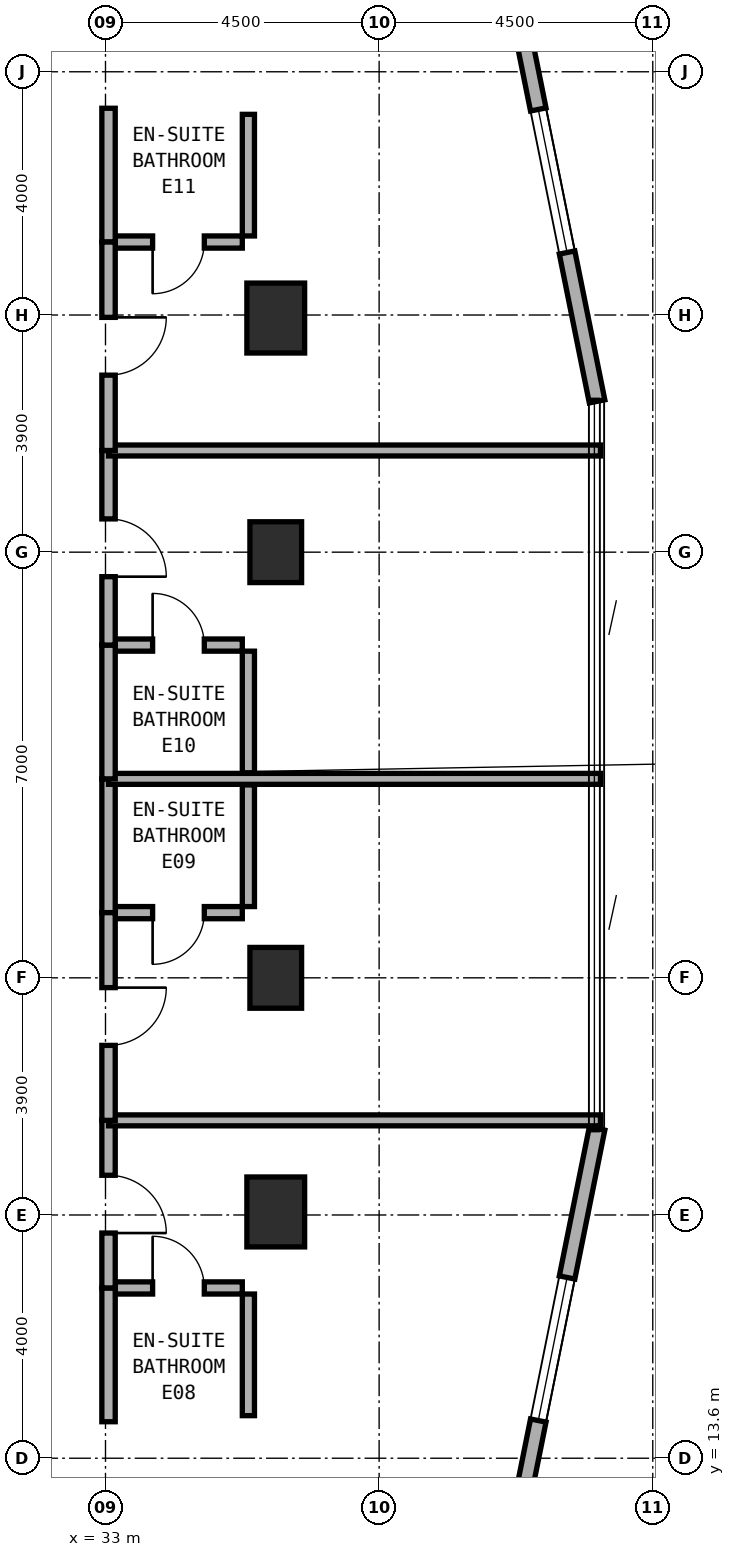
"""IFC4 building model, lengths in metres.
Left out: names, types, materials, properties, quantities, classifications, styles, units other than length and angle.
Written with IfcOpenShell. Run it as: python <this file> out.ifc"""

import sys

from ifc_helpers import new_model, si_unit, direction, frame, frame_2d, origin, origin_2d, place, context, subcontext, project, spatial, rectangle, extrude, element, fill, save


model = new_model("IFC4")
c1 = context("Model", 3, precision=1e-05, world=origin(), true_north=direction((0.0, 1.0)))
c2 = subcontext(c1, "Body", "Model", "MODEL_VIEW")
j1 = project(units=[si_unit("LENGTHUNIT", "METRE"), si_unit("PLANEANGLEUNIT", "RADIAN")], contexts=[c1])
p1 = place(None, origin())
s1 = spatial("IfcSite", under=j1, at=p1, CompositionType="ELEMENT")
p2 = place(p1, origin())
s2 = spatial("IfcBuilding", under=s1, at=p2, CompositionType="ELEMENT")
p3 = place(p2, frame((0.0, 0.0, 95.0)))
s3 = spatial("IfcBuildingStorey", under=s2, at=p3, CompositionType="ELEMENT", Elevation=95.0)
for number, where, z_axis, x_axis in (
    (1, (35.8, 21.5, 0.0), (0.0, 0.0, 1.0), (1.0, 0.0, 0.0)),
    (2, (35.8, 28.5, 0.0), (0.0, 0.0, 1.0), (1.0, 0.0, 0.0)),
):
    element("IfcColumn", number, at=place(p3, frame(where, z_axis=z_axis, x_axis=x_axis)), inside=s3, PredefinedType="COLUMN", context=c2, shape_type="SweptSolid", body=[
        extrude(rectangle(XDim=0.85, YDim=1.0, at=origin_2d()), origin(), (0.0, 0.0, 1.0), 3.5),
    ])
for number, where, z_axis, x_axis in (
    (3, (35.8, 17.65, 0.0), (0.0, 0.0, 1.0), (1.0, 0.0, 0.0)),
    (4, (35.8, 32.35, 0.0), (0.0, 0.0, 1.0), (1.0, 0.0, 0.0)),
):
    element("IfcColumn", number, at=place(p3, frame(where, z_axis=z_axis, x_axis=x_axis)), inside=s3, PredefinedType="COLUMN", context=c2, shape_type="SweptSolid", body=[
        extrude(rectangle(XDim=0.95, YDim=1.15, at=origin_2d()), origin(), (0.0, 0.0, 1.0), 3.5),
    ])
p4 = place(p3, frame((39.271, 10.018, 0.0), z_axis=(0.0, 0.0, 1.0), x_axis=(0.197435082048, 0.980315963543, 0.0)))
e5 = element("IfcWall", 5, at=p4, inside=s3, PredefinedType="STANDARD", context=c2, shape_type="SweptSolid", body=[
    extrude(rectangle(XDim=9.183, YDim=0.26, at=frame_2d((4.591, 0.0))), origin(), (0.0, 0.0, 1.0), 3.22),
])
p5 = place(p4, frame((4.286, 0.0, 0.8)))
e6 = element("IfcOpeningElement", 6, at=p5, cuts=e5, PredefinedType="OPENING", context=c2, shape_type="SweptSolid", body=[
    extrude(rectangle(XDim=2.4, YDim=1.6, at=frame_2d((1.2, 0.8))), frame((0.0, 0.14, 0.0), z_axis=(0.0, -1.0, 0.0), x_axis=(1.0, 0.0, 0.0)), (0.0, 0.0, 1.0), 0.28),
])
p6 = place(p3, frame((41.084, 30.98, 0.0), z_axis=(0.0, 0.0, 1.0), x_axis=(-0.197435082048, 0.980315963543, 0.0)))
e7 = element("IfcWall", 7, at=p6, inside=s3, PredefinedType="STANDARD", context=c2, shape_type="SweptSolid", body=[
    extrude(rectangle(XDim=9.183, YDim=0.26, at=frame_2d((4.591, 0.0))), origin(), (0.0, 0.0, 1.0), 3.22),
])
p7 = place(p6, frame((2.497, 0.0, 0.8)))
e8 = element("IfcOpeningElement", 8, at=p7, cuts=e7, PredefinedType="OPENING", context=c2, shape_type="SweptSolid", body=[
    extrude(rectangle(XDim=2.4, YDim=1.6, at=frame_2d((1.2, 0.8))), frame((0.0, 0.14, 0.0), z_axis=(0.0, -1.0, 0.0), x_axis=(1.0, 0.0, 0.0)), (0.0, 0.0, 1.0), 0.28),
])
p8 = place(p3, frame((33.15, 16.4, 0.0), z_axis=(0.0, 0.0, 1.0), x_axis=(1.0, 0.0, 0.0)))
e9 = element("IfcWall", 9, at=p8, inside=s3, PredefinedType="PLUMBINGWALL", context=c2, shape_type="SweptSolid", body=[
    extrude(rectangle(XDim=2.1, YDim=0.2, at=frame_2d((1.05, 0.0))), origin(), (0.0, 0.0, 1.0), 3.22),
])
p9 = place(p8, frame((0.625, 0.0, 0.0)))
e10 = element("IfcOpeningElement", 10, at=p9, cuts=e9, PredefinedType="OPENING", context=c2, shape_type="SweptSolid", body=[
    extrude(rectangle(XDim=0.85, YDim=2.1, at=frame_2d((0.425, 1.05))), frame((0.0, 0.11, 0.0), z_axis=(0.0, -1.0, 0.0), x_axis=(1.0, 0.0, 0.0)), (0.0, 0.0, 1.0), 0.22),
])
p10 = place(p3, frame((35.35, 14.3, 0.0), z_axis=(0.0, 0.0, 1.0), x_axis=(0.0, 1.0, 0.0)))
e11 = element("IfcWall", 11, at=p10, inside=s3, PredefinedType="PLUMBINGWALL", context=c2, shape_type="SweptSolid", body=[
    extrude(rectangle(XDim=2.0, YDim=0.2, at=frame_2d((1.0, 0.0))), origin(), (0.0, 0.0, 1.0), 2.835),
])
p11 = place(p3, frame((33.05, 14.2, 0.0), z_axis=(0.0, 0.0, 1.0), x_axis=(0.0, 1.0, 0.0)))
e12 = element("IfcWall", 12, at=p11, inside=s3, PredefinedType="SOLIDWALL", context=c2, shape_type="SweptSolid", body=[
    extrude(rectangle(XDim=2.2, YDim=0.22, at=frame_2d((1.1, 0.0))), origin(), (0.0, 0.0, 1.0), 3.22),
])
p12 = place(p3, frame((33.05, 16.4, 0.0), z_axis=(0.0, 0.0, 1.0), x_axis=(0.0, 1.0, 0.0)))
e13 = element("IfcWall", 13, at=p12, inside=s3, PredefinedType="SOLIDWALL", context=c2, shape_type="SweptSolid", body=[
    extrude(rectangle(XDim=2.756, YDim=0.22, at=frame_2d((1.378, 0.0))), origin(), (0.0, 0.0, 1.0), 2.595),
])
p13 = place(p12, frame((0.903, 0.0, 0.0)))
e14 = element("IfcOpeningElement", 14, at=p13, cuts=e13, PredefinedType="OPENING", context=c2, shape_type="SweptSolid", body=[
    extrude(rectangle(XDim=0.95, YDim=2.1, at=frame_2d((0.475, 1.05))), frame((0.0, 0.12, 0.0), z_axis=(0.0, -1.0, 0.0), x_axis=(1.0, 0.0, 0.0)), (0.0, 0.0, 1.0), 0.24),
])
p14 = place(p3, frame((33.05, 19.156, 0.0), z_axis=(0.0, 0.0, 1.0), x_axis=(1.0, 0.0, 0.0)))
e15 = element("IfcWall", 15, at=p14, inside=s3, PredefinedType="SOLIDWALL", context=c2, shape_type="SweptSolid", body=[
    extrude(rectangle(XDim=8.09, YDim=0.18, at=frame_2d((4.045, 0.0))), origin(), (0.0, 0.0, 1.0), 2.835),
])
p15 = place(p3, frame((33.15, 22.572, 0.0), z_axis=(0.0, 0.0, 1.0), x_axis=(1.0, 0.0, 0.0)))
e16 = element("IfcWall", 16, at=p15, inside=s3, PredefinedType="PLUMBINGWALL", context=c2, shape_type="SweptSolid", body=[
    extrude(rectangle(XDim=2.1, YDim=0.2, at=frame_2d((1.05, 0.0))), origin(), (0.0, 0.0, 1.0), 3.22),
])
p16 = place(p15, frame((0.625, 0.0, 0.0)))
e17 = element("IfcOpeningElement", 17, at=p16, cuts=e16, PredefinedType="OPENING", context=c2, shape_type="SweptSolid", body=[
    extrude(rectangle(XDim=0.85, YDim=2.1, at=frame_2d((0.425, 1.05))), frame((0.0, 0.11, 0.0), z_axis=(0.0, -1.0, 0.0), x_axis=(1.0, 0.0, 0.0)), (0.0, 0.0, 1.0), 0.22),
])
p17 = place(p3, frame((35.35, 22.672, 0.0), z_axis=(0.0, 0.0, 1.0), x_axis=(0.0, 1.0, 0.0)))
e18 = element("IfcWall", 18, at=p17, inside=s3, PredefinedType="PLUMBINGWALL", context=c2, shape_type="SweptSolid", body=[
    extrude(rectangle(XDim=2.0, YDim=0.2, at=frame_2d((1.0, 0.0))), origin(), (0.0, 0.0, 1.0), 3.22),
])
p18 = place(p3, frame((33.05, 22.572, 0.0), z_axis=(0.0, 0.0, 1.0), x_axis=(0.0, 1.0, 0.0)))
e19 = element("IfcWall", 19, at=p18, inside=s3, PredefinedType="SOLIDWALL", context=c2, shape_type="SweptSolid", body=[
    extrude(rectangle(XDim=2.2, YDim=0.22, at=frame_2d((1.1, 0.0))), origin(), (0.0, 0.0, 1.0), 3.22),
])
p19 = place(p3, frame((33.05, 19.156, 0.0), z_axis=(0.0, 0.0, 1.0), x_axis=(0.0, 1.0, 0.0)))
e20 = element("IfcWall", 20, at=p19, inside=s3, PredefinedType="SOLIDWALL", context=c2, shape_type="SweptSolid", body=[
    extrude(rectangle(XDim=3.416, YDim=0.22, at=frame_2d((1.708, 0.0))), origin(), (0.0, 0.0, 1.0), 2.595),
])
p20 = place(p19, frame((1.233, 0.0, 0.0)))
e21 = element("IfcOpeningElement", 21, at=p20, cuts=e20, PredefinedType="OPENING", context=c2, shape_type="SweptSolid", body=[
    extrude(rectangle(XDim=0.95, YDim=2.1, at=frame_2d((0.475, 1.05))), frame((0.0, 0.12, 0.0), z_axis=(0.0, -1.0, 0.0), x_axis=(1.0, 0.0, 0.0)), (0.0, 0.0, 1.0), 0.24),
])
p21 = place(p3, frame((33.05, 24.772, 0.0), z_axis=(0.0, 0.0, 1.0), x_axis=(1.0, 0.0, 0.0)))
e22 = element("IfcWall", 22, at=p21, inside=s3, PredefinedType="SOLIDWALL", context=c2, shape_type="SweptSolid", body=[
    extrude(rectangle(XDim=8.09, YDim=0.18, at=frame_2d((4.045, 0.0))), origin(), (0.0, 0.0, 1.0), 2.835),
])
p22 = place(p3, frame((33.15, 26.972, 0.0), z_axis=(0.0, 0.0, 1.0), x_axis=(1.0, 0.0, 0.0)))
e23 = element("IfcWall", 23, at=p22, inside=s3, PredefinedType="PLUMBINGWALL", context=c2, shape_type="SweptSolid", body=[
    extrude(rectangle(XDim=2.1, YDim=0.2, at=frame_2d((1.05, 0.0))), origin(), (0.0, 0.0, 1.0), 3.22),
])
p23 = place(p22, frame((0.625, 0.0, 0.0)))
e24 = element("IfcOpeningElement", 24, at=p23, cuts=e23, PredefinedType="OPENING", context=c2, shape_type="SweptSolid", body=[
    extrude(rectangle(XDim=0.85, YDim=2.1, at=frame_2d((0.425, 1.05))), frame((0.0, 0.11, 0.0), z_axis=(0.0, -1.0, 0.0), x_axis=(1.0, 0.0, 0.0)), (0.0, 0.0, 1.0), 0.22),
])
p24 = place(p3, frame((35.35, 24.872, 0.0), z_axis=(0.0, 0.0, 1.0), x_axis=(0.0, 1.0, 0.0)))
e25 = element("IfcWall", 25, at=p24, inside=s3, PredefinedType="PLUMBINGWALL", context=c2, shape_type="SweptSolid", body=[
    extrude(rectangle(XDim=2.0, YDim=0.2, at=frame_2d((1.0, 0.0))), origin(), (0.0, 0.0, 1.0), 3.22),
])
p25 = place(p3, frame((33.05, 24.772, 0.0), z_axis=(0.0, 0.0, 1.0), x_axis=(0.0, 1.0, 0.0)))
e26 = element("IfcWall", 26, at=p25, inside=s3, PredefinedType="SOLIDWALL", context=c2, shape_type="SweptSolid", body=[
    extrude(rectangle(XDim=2.2, YDim=0.22, at=frame_2d((1.1, 0.0))), origin(), (0.0, 0.0, 1.0), 3.22),
])
p26 = place(p3, frame((33.05, 26.972, 0.0), z_axis=(0.0, 0.0, 1.0), x_axis=(0.0, 1.0, 0.0)))
e27 = element("IfcWall", 27, at=p26, inside=s3, PredefinedType="SOLIDWALL", context=c2, shape_type="SweptSolid", body=[
    extrude(rectangle(XDim=3.2, YDim=0.22, at=frame_2d((1.6, 0.0))), origin(), (0.0, 0.0, 1.0), 2.595),
])
p27 = place(p26, frame((1.125, 0.0, 0.0)))
e28 = element("IfcOpeningElement", 28, at=p27, cuts=e27, PredefinedType="OPENING", context=c2, shape_type="SweptSolid", body=[
    extrude(rectangle(XDim=0.95, YDim=2.1, at=frame_2d((0.475, 1.05))), frame((0.0, 0.12, 0.0), z_axis=(0.0, -1.0, 0.0), x_axis=(1.0, 0.0, 0.0)), (0.0, 0.0, 1.0), 0.24),
])
p28 = place(p3, frame((33.05, 30.172, 0.0), z_axis=(0.0, 0.0, 1.0), x_axis=(1.0, 0.0, 0.0)))
e29 = element("IfcWall", 29, at=p28, inside=s3, PredefinedType="SOLIDWALL", context=c2, shape_type="SweptSolid", body=[
    extrude(rectangle(XDim=8.09, YDim=0.18, at=frame_2d((4.045, 0.0))), origin(), (0.0, 0.0, 1.0), 2.835),
])
p29 = place(p3, frame((33.15, 33.6, 0.0), z_axis=(0.0, 0.0, 1.0), x_axis=(1.0, 0.0, 0.0)))
e30 = element("IfcWall", 30, at=p29, inside=s3, PredefinedType="PLUMBINGWALL", context=c2, shape_type="SweptSolid", body=[
    extrude(rectangle(XDim=2.1, YDim=0.2, at=frame_2d((1.05, 0.0))), origin(), (0.0, 0.0, 1.0), 3.22),
])
p30 = place(p29, frame((0.625, 0.0, 0.0)))
e31 = element("IfcOpeningElement", 31, at=p30, cuts=e30, PredefinedType="OPENING", context=c2, shape_type="SweptSolid", body=[
    extrude(rectangle(XDim=0.85, YDim=2.1, at=frame_2d((0.425, 1.05))), frame((0.0, 0.11, 0.0), z_axis=(0.0, -1.0, 0.0), x_axis=(1.0, 0.0, 0.0)), (0.0, 0.0, 1.0), 0.22),
])
p31 = place(p3, frame((35.35, 33.7, 0.0), z_axis=(0.0, 0.0, 1.0), x_axis=(0.0, 1.0, 0.0)))
e32 = element("IfcWall", 32, at=p31, inside=s3, PredefinedType="PLUMBINGWALL", context=c2, shape_type="SweptSolid", body=[
    extrude(rectangle(XDim=2.0, YDim=0.2, at=frame_2d((1.0, 0.0))), origin(), (0.0, 0.0, 1.0), 2.835),
])
p32 = place(p3, frame((33.05, 33.6, 0.0), z_axis=(0.0, 0.0, 1.0), x_axis=(0.0, 1.0, 0.0)))
e33 = element("IfcWall", 33, at=p32, inside=s3, PredefinedType="SOLIDWALL", context=c2, shape_type="SweptSolid", body=[
    extrude(rectangle(XDim=2.2, YDim=0.22, at=frame_2d((1.1, 0.0))), origin(), (0.0, 0.0, 1.0), 3.22),
])
p33 = place(p3, frame((33.05, 30.172, 0.0), z_axis=(0.0, 0.0, 1.0), x_axis=(0.0, 1.0, 0.0)))
e34 = element("IfcWall", 34, at=p33, inside=s3, PredefinedType="SOLIDWALL", context=c2, shape_type="SweptSolid", body=[
    extrude(rectangle(XDim=3.428, YDim=0.22, at=frame_2d((1.714, 0.0))), origin(), (0.0, 0.0, 1.0), 2.595),
])
p34 = place(p33, frame((1.239, 0.0, 0.0)))
e35 = element("IfcOpeningElement", 35, at=p34, cuts=e34, PredefinedType="OPENING", context=c2, shape_type="SweptSolid", body=[
    extrude(rectangle(XDim=0.95, YDim=2.1, at=frame_2d((0.475, 1.05))), frame((0.0, 0.12, 0.0), z_axis=(0.0, -1.0, 0.0), x_axis=(1.0, 0.0, 0.0)), (0.0, 0.0, 1.0), 0.24),
])
p35 = place(p5, origin())
e36 = element("IfcWindow", 36, at=p35, inside=s3, PartitioningType="SINGLE_PANEL", PredefinedType="WINDOW", context=c2, shape_type="SweptSolid", body=[
    extrude(rectangle(XDim=2.4, YDim=1.6, at=frame_2d((1.2, 0.8))), frame((0.0, 0.03, 0.0), z_axis=(0.0, -1.0, 0.0), x_axis=(1.0, 0.0, 0.0)), (0.0, 0.0, 1.0), 0.06),
])
fill(e6, e36)
p36 = place(p7, origin())
e37 = element("IfcWindow", 37, at=p36, inside=s3, PartitioningType="SINGLE_PANEL", PredefinedType="WINDOW", context=c2, shape_type="SweptSolid", body=[
    extrude(rectangle(XDim=2.4, YDim=1.6, at=frame_2d((1.2, 0.8))), frame((0.0, 0.03, 0.0), z_axis=(0.0, -1.0, 0.0), x_axis=(1.0, 0.0, 0.0)), (0.0, 0.0, 1.0), 0.06),
])
fill(e8, e37)
p37 = place(p9, origin())
e38 = element("IfcDoor", 38, at=p37, inside=s3, OperationType="SINGLE_SWING_LEFT", PredefinedType="DOOR", context=c2, shape_type="SweptSolid", body=[
    extrude(rectangle(XDim=0.85, YDim=2.1, at=frame_2d((0.425, 1.05))), frame((0.0, 0.025, 0.0), z_axis=(0.0, -1.0, 0.0), x_axis=(1.0, 0.0, 0.0)), (0.0, 0.0, 1.0), 0.05),
])
fill(e10, e38)
p38 = place(p13, frame((0.95, 0.0, 0.0), z_axis=(0.0, 0.0, 1.0), x_axis=(-1.0, 0.0, 0.0)))
e39 = element("IfcDoor", 39, at=p38, inside=s3, OperationType="SINGLE_SWING_RIGHT", PredefinedType="DOOR", context=c2, shape_type="SweptSolid", body=[
    extrude(rectangle(XDim=0.95, YDim=2.1, at=frame_2d((0.475, 1.05))), frame((0.0, 0.025, 0.0), z_axis=(0.0, -1.0, 0.0), x_axis=(1.0, 0.0, 0.0)), (0.0, 0.0, 1.0), 0.05),
])
fill(e14, e39)
p39 = place(p16, frame((0.85, 0.0, 0.0), z_axis=(0.0, 0.0, 1.0), x_axis=(-1.0, 0.0, 0.0)))
e40 = element("IfcDoor", 40, at=p39, inside=s3, OperationType="SINGLE_SWING_RIGHT", PredefinedType="DOOR", context=c2, shape_type="SweptSolid", body=[
    extrude(rectangle(XDim=0.85, YDim=2.1, at=frame_2d((0.425, 1.05))), frame((0.0, 0.025, 0.0), z_axis=(0.0, -1.0, 0.0), x_axis=(1.0, 0.0, 0.0)), (0.0, 0.0, 1.0), 0.05),
])
fill(e17, e40)
p40 = place(p20, frame((0.95, 0.0, 0.0), z_axis=(0.0, 0.0, 1.0), x_axis=(-1.0, 0.0, 0.0)))
e41 = element("IfcDoor", 41, at=p40, inside=s3, OperationType="SINGLE_SWING_LEFT", PredefinedType="DOOR", context=c2, shape_type="SweptSolid", body=[
    extrude(rectangle(XDim=0.95, YDim=2.1, at=frame_2d((0.475, 1.05))), frame((0.0, 0.025, 0.0), z_axis=(0.0, -1.0, 0.0), x_axis=(1.0, 0.0, 0.0)), (0.0, 0.0, 1.0), 0.05),
])
fill(e21, e41)
p41 = place(p23, origin())
e42 = element("IfcDoor", 42, at=p41, inside=s3, OperationType="SINGLE_SWING_LEFT", PredefinedType="DOOR", context=c2, shape_type="SweptSolid", body=[
    extrude(rectangle(XDim=0.85, YDim=2.1, at=frame_2d((0.425, 1.05))), frame((0.0, 0.025, 0.0), z_axis=(0.0, -1.0, 0.0), x_axis=(1.0, 0.0, 0.0)), (0.0, 0.0, 1.0), 0.05),
])
fill(e24, e42)
p42 = place(p27, frame((0.95, 0.0, 0.0), z_axis=(0.0, 0.0, 1.0), x_axis=(-1.0, 0.0, 0.0)))
e43 = element("IfcDoor", 43, at=p42, inside=s3, OperationType="SINGLE_SWING_RIGHT", PredefinedType="DOOR", context=c2, shape_type="SweptSolid", body=[
    extrude(rectangle(XDim=0.95, YDim=2.1, at=frame_2d((0.475, 1.05))), frame((0.0, 0.025, 0.0), z_axis=(0.0, -1.0, 0.0), x_axis=(1.0, 0.0, 0.0)), (0.0, 0.0, 1.0), 0.05),
])
fill(e28, e43)
p43 = place(p30, frame((0.85, 0.0, 0.0), z_axis=(0.0, 0.0, 1.0), x_axis=(-1.0, 0.0, 0.0)))
e44 = element("IfcDoor", 44, at=p43, inside=s3, OperationType="SINGLE_SWING_RIGHT", PredefinedType="DOOR", context=c2, shape_type="SweptSolid", body=[
    extrude(rectangle(XDim=0.85, YDim=2.1, at=frame_2d((0.425, 1.05))), frame((0.0, 0.025, 0.0), z_axis=(0.0, -1.0, 0.0), x_axis=(1.0, 0.0, 0.0)), (0.0, 0.0, 1.0), 0.05),
])
fill(e31, e44)
p44 = place(p34, frame((0.95, 0.0, 0.0), z_axis=(0.0, 0.0, 1.0), x_axis=(-1.0, 0.0, 0.0)))
e45 = element("IfcDoor", 45, at=p44, inside=s3, OperationType="SINGLE_SWING_LEFT", PredefinedType="DOOR", context=c2, shape_type="SweptSolid", body=[
    extrude(rectangle(XDim=0.95, YDim=2.1, at=frame_2d((0.475, 1.05))), frame((0.0, 0.025, 0.0), z_axis=(0.0, -1.0, 0.0), x_axis=(1.0, 0.0, 0.0)), (0.0, 0.0, 1.0), 0.05),
])
fill(e35, e45)
save(model, sys.argv[1])
